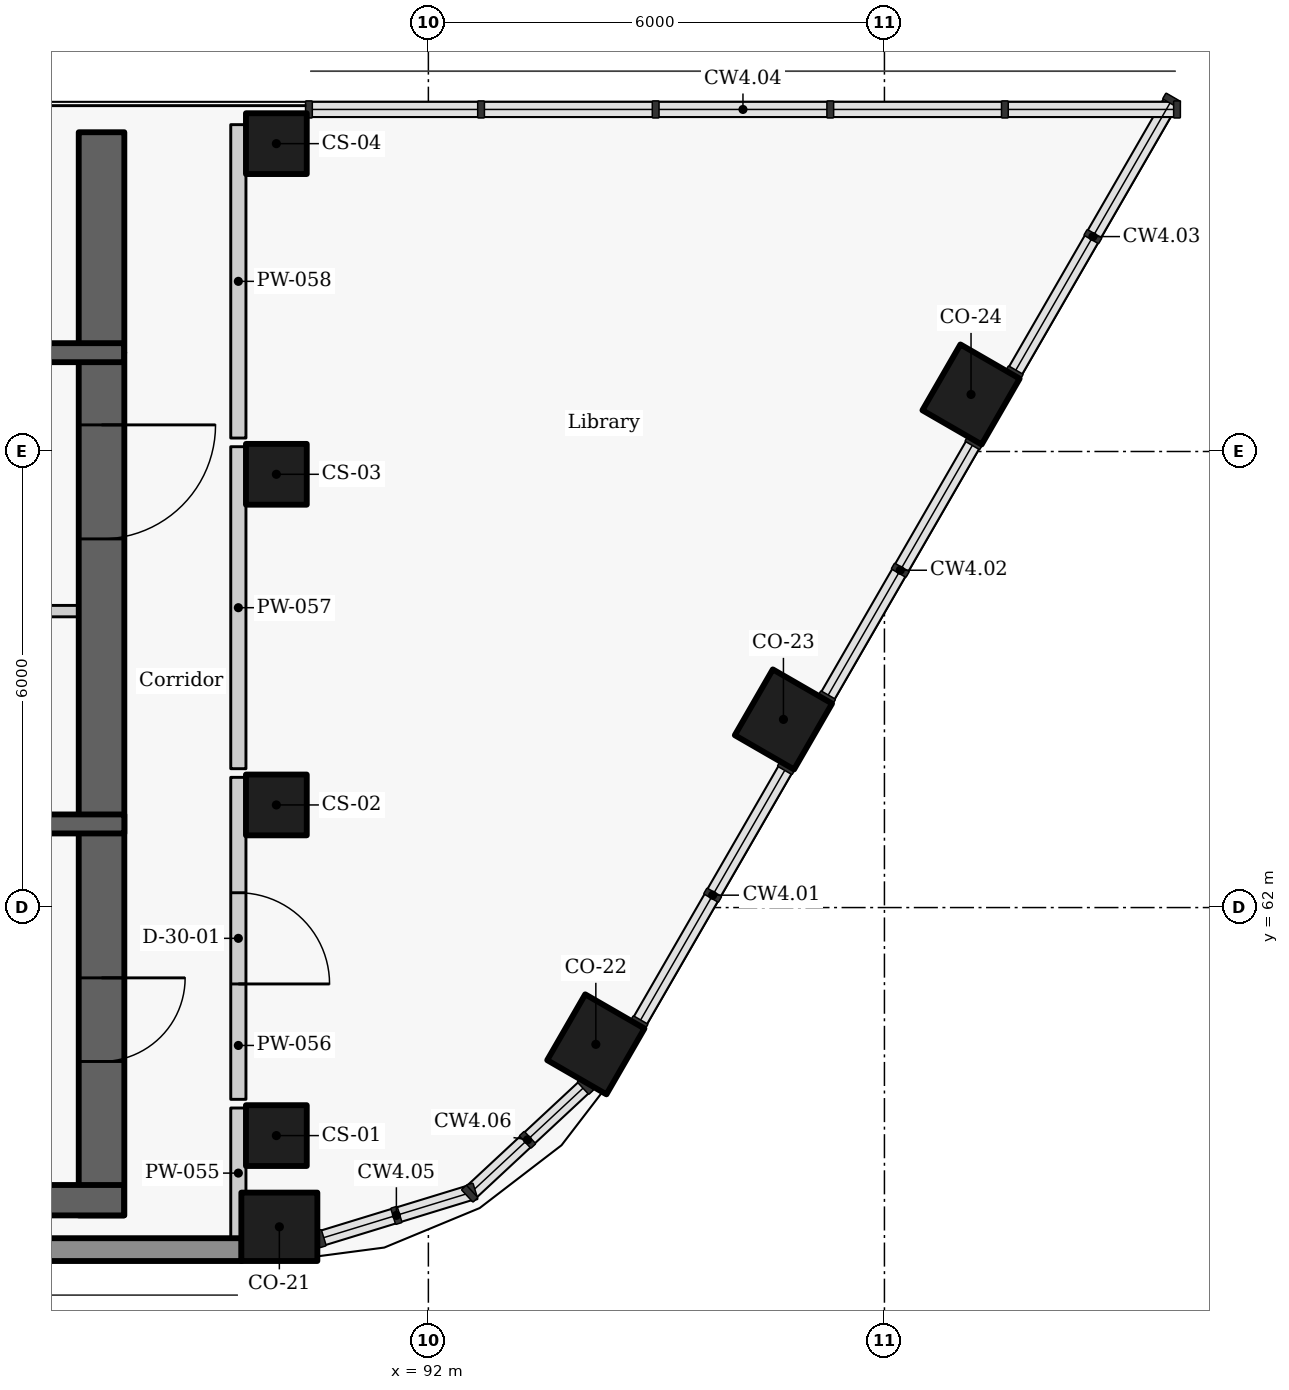
"""IFC4 building model, lengths in metres.
Left out: names, types, materials, properties, quantities, classifications, styles, units other than length and angle.
Written with IfcOpenShell. Run it as: python <this file> out.ifc"""

import sys

from ifc_helpers import new_model, si_unit, direction, frame, frame_2d, origin, origin_2d, place, context, subcontext, project, spatial, rectangle, extrude, element, fill, save


model = new_model("IFC4")
c1 = context("Model", 3, precision=1e-05, world=origin(), true_north=direction((0.0, 1.0)))
c2 = subcontext(c1, "Body", "Model", "MODEL_VIEW")
j1 = project(units=[si_unit("LENGTHUNIT", "METRE"), si_unit("PLANEANGLEUNIT", "RADIAN")], contexts=[c1])
p1 = place(None, origin())
s1 = spatial("IfcSite", under=j1, at=p1, CompositionType="ELEMENT")
p2 = place(p1, origin())
s2 = spatial("IfcBuilding", under=s1, at=p2, CompositionType="ELEMENT")
p3 = place(p2, frame((0.0, 0.0, 286.8)))
s3 = spatial("IfcBuildingStorey", under=s2, at=p3, CompositionType="ELEMENT", Elevation=286.8)
for number, where, z_axis, x_axis in (
    (1, (90.04, 57.8, 0.0), (0.0, 0.0, 1.0), (1.0, 0.0, 0.0)),
    (2, (94.203, 60.2, 0.0), (0.0, 0.0, 1.0), (0.5, 0.866, 0.0)),
    (3, (96.671, 64.475, 0.0), (0.0, 0.0, 1.0), (0.5, 0.866, 0.0)),
    (4, (99.139, 68.75, 0.0), (0.0, 0.0, 1.0), (0.5, 0.866, 0.0)),
):
    element("IfcColumn", number, at=place(p3, frame(where, z_axis=z_axis, x_axis=x_axis)), inside=s3, PredefinedType="COLUMN", context=c2, shape_type="SweptSolid", body=[
        extrude(rectangle(XDim=1.0, YDim=0.9, at=origin_2d()), origin(), (0.0, 0.0, 1.0), 3.6),
    ])
for number, where, z_axis, x_axis in (
    (5, (90.0, 59.0, 0.0), (0.0, 0.0, 1.0), (0.0, 1.0, 0.0)),
    (6, (90.0, 63.35, 0.0), (0.0, 0.0, 1.0), (0.0, 1.0, 0.0)),
    (7, (90.0, 67.7, 0.0), (0.0, 0.0, 1.0), (0.0, 1.0, 0.0)),
    (8, (90.0, 72.05, 0.0), (0.0, 0.0, 1.0), (0.0, 1.0, 0.0)),
):
    element("IfcColumn", number, at=place(p3, frame(where, z_axis=z_axis, x_axis=x_axis)), inside=s3, PredefinedType="COLUMN", context=c2, shape_type="SweptSolid", body=[
        extrude(rectangle(XDim=0.8, YDim=0.8, at=origin_2d()), origin(), (0.0, 0.0, 1.0), 3.6),
    ])
p4 = place(p3, frame((70.451, 57.5, 0.0), z_axis=(0.0, 0.0, 1.0), x_axis=(1.0, 0.0, 0.0)))
e9 = element("IfcWall", 9, at=p4, inside=s3, PredefinedType="SOLIDWALL", context=c2, shape_type="SweptSolid", body=[
    extrude(rectangle(XDim=19.093, YDim=0.3, at=frame_2d((9.546, 0.0))), origin(), (0.0, 0.0, 1.0), 2.725),
])
p5 = place(p3, frame((88.0, 65.9, 0.0), z_axis=(0.0, 0.0, 1.0), x_axis=(-1.0, 0.0, 0.0)))
e10 = element("IfcWall", 10, at=p5, inside=s3, PredefinedType="PARTITIONING", context=c2, shape_type="SweptSolid", body=[
    extrude(rectangle(XDim=2.603, YDim=0.15, at=frame_2d((1.302, 0.0))), origin(), (0.0, 0.0, 1.0), 3.325),
])
p6 = place(p5, frame((1.175, 0.0, 0.0)))
e11 = element("IfcOpeningElement", 11, at=p6, cuts=e10, PredefinedType="OPENING", context=c2, shape_type="SweptSolid", body=[
    extrude(rectangle(XDim=0.9, YDim=2.1, at=frame_2d((0.45, 1.05))), frame((0.0, 0.085, 0.0), z_axis=(0.0, -1.0, 0.0), x_axis=(1.0, 0.0, 0.0)), (0.0, 0.0, 1.0), 0.17),
])
p7 = place(p3, frame((87.7, 69.3, -0.275), z_axis=(0.0, 0.0, 1.0), x_axis=(0.0, -1.0, 0.0)))
e12 = element("IfcWall", 12, at=p7, inside=s3, PredefinedType="SHEAR", context=c2, shape_type="SweptSolid", body=[
    extrude(rectangle(XDim=11.35, YDim=0.6, at=frame_2d((5.675, 0.0))), origin(), (0.0, 0.0, 1.0), 3.6),
])
p8 = place(p7, frame((0.95, 0.0, 0.275)))
e13 = element("IfcOpeningElement", 13, at=p8, cuts=e12, PredefinedType="OPENING", context=c2, shape_type="SweptSolid", body=[
    extrude(rectangle(XDim=1.5, YDim=2.1, at=frame_2d((0.75, 1.05))), frame((0.0, 0.31, 0.0), z_axis=(0.0, -1.0, 0.0), x_axis=(1.0, 0.0, 0.0)), (0.0, 0.0, 1.0), 0.62),
])
p9 = place(p7, frame((8.225, 0.0, 0.275)))
e14 = element("IfcOpeningElement", 14, at=p9, cuts=e12, PredefinedType="OPENING", context=c2, shape_type="SweptSolid", body=[
    extrude(rectangle(XDim=1.1, YDim=2.1, at=frame_2d((0.55, 1.05))), frame((0.0, 0.31, 0.0), z_axis=(0.0, -1.0, 0.0), x_axis=(1.0, 0.0, 0.0)), (0.0, 0.0, 1.0), 0.62),
])
p10 = place(p3, frame((80.547, 63.1, -0.275), z_axis=(0.0, 0.0, 1.0), x_axis=(1.0, 0.0, 0.0)))
e15 = element("IfcWall", 15, at=p10, inside=s3, PredefinedType="SHEAR", context=c2, shape_type="SweptSolid", body=[
    extrude(rectangle(XDim=7.453, YDim=0.25, at=frame_2d((3.727, 0.0))), origin(), (0.0, 0.0, 1.0), 3.6),
])
p11 = place(p10, frame((3.302, 0.0, 0.275)))
e16 = element("IfcOpeningElement", 16, at=p11, cuts=e15, PredefinedType="OPENING", context=c2, shape_type="SweptSolid", body=[
    extrude(rectangle(XDim=1.1, YDim=2.1, at=frame_2d((0.55, 1.05))), frame((0.0, 0.135, 0.0), z_axis=(0.0, -1.0, 0.0), x_axis=(1.0, 0.0, 0.0)), (0.0, 0.0, 1.0), 0.27),
])
p12 = place(p3, frame((89.5, 57.65, 0.0), z_axis=(0.0, 0.0, 1.0), x_axis=(0.0, 1.0, 0.0)))
e17 = element("IfcWall", 17, at=p12, inside=s3, PredefinedType="PARTITIONING", context=c2, shape_type="SweptSolid", body=[
    extrude(rectangle(XDim=1.713, YDim=0.2, at=frame_2d((0.856, 0.0))), origin(), (0.0, 0.0, 1.0), 3.325),
])
p13 = place(p3, frame((89.5, 63.713, 0.0), z_axis=(0.0, 0.0, 1.0), x_axis=(0.0, -1.0, 0.0)))
e18 = element("IfcWall", 18, at=p13, inside=s3, PredefinedType="PARTITIONING", context=c2, shape_type="SweptSolid", body=[
    extrude(rectangle(XDim=4.236, YDim=0.2, at=frame_2d((2.118, 0.0))), origin(), (0.0, 0.0, 1.0), 3.325),
])
p14 = place(p13, frame((1.518, 0.0, 0.0)))
e19 = element("IfcOpeningElement", 19, at=p14, cuts=e18, PredefinedType="OPENING", context=c2, shape_type="SweptSolid", body=[
    extrude(rectangle(XDim=1.2, YDim=2.1, at=frame_2d((0.6, 1.05))), frame((0.0, 0.11, 0.0), z_axis=(0.0, -1.0, 0.0), x_axis=(1.0, 0.0, 0.0)), (0.0, 0.0, 1.0), 0.22),
])
p15 = place(p3, frame((89.5, 63.827, 0.0), z_axis=(0.0, 0.0, 1.0), x_axis=(0.0, 1.0, 0.0)))
e20 = element("IfcWall", 20, at=p15, inside=s3, PredefinedType="PARTITIONING", context=c2, shape_type="SweptSolid", body=[
    extrude(rectangle(XDim=4.236, YDim=0.2, at=frame_2d((2.118, 0.0))), origin(), (0.0, 0.0, 1.0), 3.325),
])
p16 = place(p3, frame((89.5, 68.177, 0.0), z_axis=(0.0, 0.0, 1.0), x_axis=(0.0, 1.0, 0.0)))
e21 = element("IfcWall", 21, at=p16, inside=s3, PredefinedType="PARTITIONING", context=c2, shape_type="SweptSolid", body=[
    extrude(rectangle(XDim=4.123, YDim=0.2, at=frame_2d((2.062, 0.0))), origin(), (0.0, 0.0, 1.0), 3.325),
])
p17 = place(p3, frame((87.7, 69.304, -0.275), z_axis=(0.0, 0.0, 1.0), x_axis=(0.0, 1.0, 0.0)))
e22 = element("IfcWall", 22, at=p17, inside=s3, PredefinedType="SHEAR", context=c2, shape_type="SweptSolid", body=[
    extrude(rectangle(XDim=2.896, YDim=0.6, at=frame_2d((1.448, 0.0))), origin(), (0.0, 0.0, 1.0), 3.6),
])
p18 = place(p3, frame((85.404, 69.3, -0.275), z_axis=(0.0, 0.0, 1.0), x_axis=(1.0, 0.0, 0.0)))
e23 = element("IfcWall", 23, at=p18, inside=s3, PredefinedType="SHEAR", context=c2, shape_type="SweptSolid", body=[
    extrude(rectangle(XDim=2.592, YDim=0.25, at=frame_2d((1.296, 0.0))), origin(), (0.0, 0.0, 1.0), 3.6),
])
p19 = place(p3, frame((72.004, 58.15, -0.275), z_axis=(0.0, 0.0, 1.0), x_axis=(1.0, 0.0, 0.0)))
e24 = element("IfcWall", 24, at=p19, inside=s3, PredefinedType="SHEAR", context=c2, shape_type="SweptSolid", body=[
    extrude(rectangle(XDim=15.992, YDim=0.4, at=frame_2d((7.996, 0.0))), origin(), (0.0, 0.0, 1.0), 3.6),
])
p20 = place(p14, origin())
e25 = element("IfcDoor", 25, at=p20, inside=s3, OperationType="SINGLE_SWING_RIGHT", PredefinedType="DOOR", context=c2, shape_type="SweptSolid", body=[
    extrude(rectangle(XDim=1.2, YDim=2.1, at=frame_2d((0.6, 1.05))), frame((0.0, 0.025, 0.0), z_axis=(0.0, -1.0, 0.0), x_axis=(1.0, 0.0, 0.0)), (0.0, 0.0, 1.0), 0.05),
])
fill(e19, e25)
p21 = place(p8, origin())
e26 = element("IfcDoor", 26, at=p21, inside=s3, OperationType="DOUBLE_DOOR_SINGLE_SWING", PredefinedType="DOOR", context=c2, shape_type="SweptSolid", body=[
    extrude(rectangle(XDim=1.5, YDim=2.1, at=frame_2d((0.75, 1.05))), frame((0.0, 0.025, 0.0), z_axis=(0.0, -1.0, 0.0), x_axis=(1.0, 0.0, 0.0)), (0.0, 0.0, 1.0), 0.05),
])
fill(e13, e26)
p22 = place(p9, origin())
e27 = element("IfcDoor", 27, at=p22, inside=s3, OperationType="SINGLE_SWING_LEFT", PredefinedType="DOOR", context=c2, shape_type="SweptSolid", body=[
    extrude(rectangle(XDim=1.1, YDim=2.1, at=frame_2d((0.55, 1.05))), frame((0.0, 0.025, 0.0), z_axis=(0.0, -1.0, 0.0), x_axis=(1.0, 0.0, 0.0)), (0.0, 0.0, 1.0), 0.05),
])
fill(e14, e27)
save(model, sys.argv[1])
